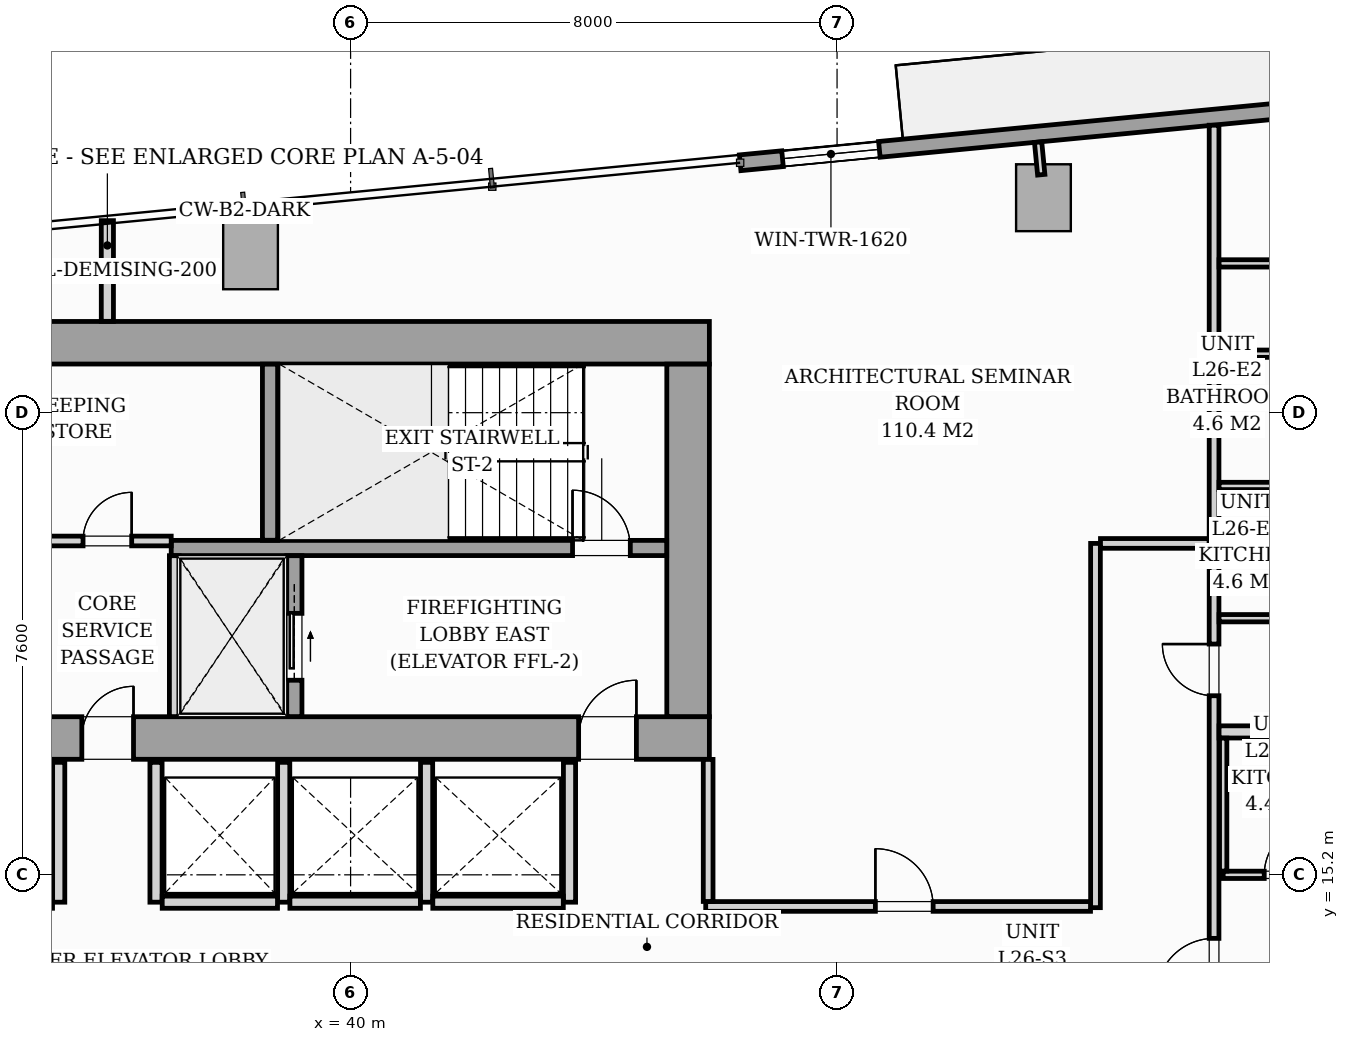
"""IFC4 building model, lengths in metres.
Left out: names, types, materials, properties, quantities, classifications, styles, units other than length and angle.
Written with IfcOpenShell. Run it as: python <this file> out.ifc"""

import sys

from ifc_helpers import new_model, si_unit, direction, frame, frame_2d, origin, origin_2d, place, context, subcontext, project, spatial, rectangle, i_section, extrude, source, transform, mapped, element, fill, save


model = new_model("IFC4")
c1 = context("Model", 3, precision=1e-05, world=origin(), true_north=direction((0.0, 1.0)))
c2 = subcontext(c1, "Body", "Model", "MODEL_VIEW")
j1 = project(units=[si_unit("LENGTHUNIT", "METRE"), si_unit("PLANEANGLEUNIT", "RADIAN")], contexts=[c1])
p1 = place(None, origin())
s1 = spatial("IfcSite", under=j1, at=p1, CompositionType="ELEMENT")
p2 = place(p1, origin())
s2 = spatial("IfcBuilding", under=s1, at=p2, CompositionType="ELEMENT")
p3 = place(p2, frame((0.0, 0.0, 93.8)))
s3 = spatial("IfcBuildingStorey", under=s2, at=p3, CompositionType="ELEMENT", Elevation=93.8)
m1 = source(origin(), c2, "Body", "SweptSolid", [
    extrude(i_section(OverallWidth=0.427, OverallDepth=0.483, WebThickness=0.051, FlangeThickness=0.082, FilletRadius=0.018, at=origin_2d()), origin(), (0.0, 0.0, 1.0), 3.196),
])
for number, where, z_axis, x_axis in (
    (1, (38.88, 17.4, 0.002), (0.0, 0.0, 1.0), (1.0, 0.0, 0.0)),
    (2, (45.6, 17.4, 0.002), (0.0, 0.0, 1.0), (1.0, 0.0, 0.0)),
    (3, (38.88, 24.0, 0.002), (0.0, 0.0, 1.0), (1.0, 0.0, 0.0)),
    (4, (45.6, 24.0, 0.002), (0.0, 0.0, 1.0), (1.0, 0.0, 0.0)),
):
    element("IfcColumn", number, at=place(p3, frame(where, z_axis=z_axis, x_axis=x_axis)), inside=s3, PredefinedType="PILASTER", context=c2, shape_type="MappedRepresentation", body=[
        mapped(m1, transform((0.0, 0.0, 0.0), scale=1.0)),
    ])
m2 = source(origin(), c2, "Body", "SweptSolid", [
    extrude(rectangle(XDim=0.9, YDim=1.1, at=origin_2d()), origin(), (0.0, 0.0, 1.0), 3.196),
])
for number, where, z_axis, x_axis in (
    (5, (38.354, 25.38, 0.002), (0.0, 0.0, 1.0), (0.995, 0.096, 0.0)),
    (6, (51.394, 26.335, 0.002), (0.0, 0.0, 1.0), (0.995, 0.096, 0.0)),
):
    element("IfcColumn", number, at=place(p3, frame(where, z_axis=z_axis, x_axis=x_axis)), inside=s3, PredefinedType="COLUMN", context=c2, shape_type="MappedRepresentation", body=[
        mapped(m2, transform((0.0, 0.0, 0.0), scale=1.0)),
    ])
p4 = place(p3, frame((46.406, 26.91, 0.0), z_axis=(0.0, 0.0, 1.0), x_axis=(0.995396638587, 0.095841180552, 0.0)))
e7 = element("IfcWall", 7, at=p4, inside=s3, PredefinedType="STANDARD", context=c2, shape_type="SweptSolid", body=[
    extrude(rectangle(XDim=19.11, YDim=0.26, at=frame_2d((9.555, 0.0))), origin(), (0.0, 0.0, 1.0), 2.94),
])
p5 = place(p4, frame((9.48, 0.0, 0.0)))
e8 = element("IfcOpeningElement", 8, at=p5, cuts=e7, PredefinedType="OPENING", context=c2, shape_type="SweptSolid", body=[
    extrude(rectangle(XDim=1.8, YDim=2.06, at=frame_2d((0.9, 1.03))), frame((0.0, 0.14, 0.0), z_axis=(0.0, -1.0, 0.0), x_axis=(1.0, 0.0, 0.0)), (0.0, 0.0, 1.0), 0.28),
])
p6 = place(p4, frame((0.7, 0.0, 0.65)))
e9 = element("IfcOpeningElement", 9, at=p6, cuts=e7, PredefinedType="OPENING", context=c2, shape_type="SweptSolid", body=[
    extrude(rectangle(XDim=1.6, YDim=1.5, at=frame_2d((0.8, 0.75))), frame((0.0, 0.14, 0.0), z_axis=(0.0, -1.0, 0.0), x_axis=(1.0, 0.0, 0.0)), (0.0, 0.0, 1.0), 0.28),
])
p7 = place(p3, frame((26.1, 17.45, 0.0), z_axis=(0.0, 0.0, 1.0), x_axis=(1.0, 0.0, 0.0)))
e10 = element("IfcWall", 10, at=p7, inside=s3, PredefinedType="SHEAR", context=c2, shape_type="SweptSolid", body=[
    extrude(rectangle(XDim=19.8, YDim=0.7, at=frame_2d((9.9, 0.0))), origin(), (0.0, 0.0, 1.0), 3.2),
])
p8 = place(p7, frame((1.05, 0.0, 0.0)))
e11 = element("IfcOpeningElement", 11, at=p8, cuts=e10, PredefinedType="OPENING", context=c2, shape_type="SweptSolid", body=[
    extrude(rectangle(XDim=0.95, YDim=2.06, at=frame_2d((0.475, 1.03))), frame((0.0, 0.36, 0.0), z_axis=(0.0, -1.0, 0.0), x_axis=(1.0, 0.0, 0.0)), (0.0, 0.0, 1.0), 0.72),
])
p9 = place(p7, frame((9.48, 0.0, 0.0)))
e12 = element("IfcOpeningElement", 12, at=p9, cuts=e10, PredefinedType="OPENING", context=c2, shape_type="SweptSolid", body=[
    extrude(rectangle(XDim=0.85, YDim=2.0, at=frame_2d((0.425, 1.0))), frame((0.0, 0.36, 0.0), z_axis=(0.0, -1.0, 0.0), x_axis=(1.0, 0.0, 0.0)), (0.0, 0.0, 1.0), 0.72),
])
p10 = place(p7, frame((17.65, 0.0, 0.0)))
e13 = element("IfcOpeningElement", 13, at=p10, cuts=e10, PredefinedType="OPENING", context=c2, shape_type="SweptSolid", body=[
    extrude(rectangle(XDim=0.95, YDim=2.06, at=frame_2d((0.475, 1.03))), frame((0.0, 0.36, 0.0), z_axis=(0.0, -1.0, 0.0), x_axis=(1.0, 0.0, 0.0)), (0.0, 0.0, 1.0), 0.72),
])
p11 = place(p3, frame((26.1, 23.95, 0.0), z_axis=(0.0, 0.0, 1.0), x_axis=(1.0, 0.0, 0.0)))
e14 = element("IfcWall", 14, at=p11, inside=s3, PredefinedType="SHEAR", context=c2, shape_type="SweptSolid", body=[
    extrude(rectangle(XDim=19.8, YDim=0.7, at=frame_2d((9.9, 0.0))), origin(), (0.0, 0.0, 1.0), 3.2),
])
p12 = place(p3, frame((45.55, 17.802, 0.0), z_axis=(0.0, 0.0, 1.0), x_axis=(0.0, 1.0, 0.0)))
e15 = element("IfcWall", 15, at=p12, inside=s3, PredefinedType="SHEAR", context=c2, shape_type="SweptSolid", body=[
    extrude(rectangle(XDim=5.796, YDim=0.7, at=frame_2d((2.898, 0.0))), origin(), (0.0, 0.0, 1.0), 3.2),
])
p13 = place(p3, frame((37.05, 20.575, 0.0), z_axis=(0.0, 0.0, 1.0), x_axis=(1.0, 0.0, 0.0)))
e16 = element("IfcWall", 16, at=p13, inside=s3, PredefinedType="SOLIDWALL", context=c2, shape_type="SweptSolid", body=[
    extrude(rectangle(XDim=8.148, YDim=0.25, at=frame_2d((4.074, 0.0))), origin(), (0.0, 0.0, 1.0), 3.2),
])
p14 = place(p13, frame((6.6, 0.0, 0.0)))
e17 = element("IfcOpeningElement", 17, at=p14, cuts=e16, PredefinedType="OPENING", context=c2, shape_type="SweptSolid", body=[
    extrude(rectangle(XDim=0.95, YDim=2.06, at=frame_2d((0.475, 1.03))), frame((0.0, 0.135, 0.0), z_axis=(0.0, -1.0, 0.0), x_axis=(1.0, 0.0, 0.0)), (0.0, 0.0, 1.0), 0.27),
])
p15 = place(p3, frame((38.675, 20.702, 0.0), z_axis=(0.0, 0.0, 1.0), x_axis=(0.0, 1.0, 0.0)))
e18 = element("IfcWall", 18, at=p15, inside=s3, PredefinedType="SOLIDWALL", context=c2, shape_type="SweptSolid", body=[
    extrude(rectangle(XDim=2.896, YDim=0.25, at=frame_2d((1.448, 0.0))), origin(), (0.0, 0.0, 1.0), 3.2),
])
p16 = place(p3, frame((37.1, 17.802, 0.0), z_axis=(0.0, 0.0, 1.0), x_axis=(0.0, 1.0, 0.0)))
e19 = element("IfcWall", 19, at=p16, inside=s3, PredefinedType="PARTITIONING", context=c2, shape_type="SweptSolid", body=[
    extrude(rectangle(XDim=2.646, YDim=0.16, at=frame_2d((1.323, 0.0))), origin(), (0.0, 0.0, 1.0), 2.94),
])
p17 = place(p3, frame((39.075, 17.802, 0.0), z_axis=(0.0, 0.0, 1.0), x_axis=(0.0, 1.0, 0.0)))
e20 = element("IfcWall", 20, at=p17, inside=s3, PredefinedType="SOLIDWALL", context=c2, shape_type="SweptSolid", body=[
    extrude(rectangle(XDim=2.646, YDim=0.25, at=frame_2d((1.323, 0.0))), origin(), (0.0, 0.0, 1.0), 3.2),
])
p18 = place(p17, frame((0.598, 0.0, 0.0)))
e21 = element("IfcOpeningElement", 21, at=p18, cuts=e20, PredefinedType="OPENING", context=c2, shape_type="SweptSolid", body=[
    extrude(rectangle(XDim=1.1, YDim=2.08, at=frame_2d((0.55, 1.04))), frame((0.0, 0.135, 0.0), z_axis=(0.0, -1.0, 0.0), x_axis=(1.0, 0.0, 0.0)), (0.0, 0.0, 1.0), 0.27),
])
p19 = place(p3, frame((34.95, 20.69, 0.0), z_axis=(0.0, 0.0, 1.0), x_axis=(1.0, 0.0, 0.0)))
e22 = element("IfcWall", 22, at=p19, inside=s3, PredefinedType="PARTITIONING", context=c2, shape_type="SweptSolid", body=[
    extrude(rectangle(XDim=2.1, YDim=0.16, at=frame_2d((1.05, 0.0))), origin(), (0.0, 0.0, 1.0), 2.94),
])
p20 = place(p19, frame((0.65, 0.0, 0.0)))
e23 = element("IfcOpeningElement", 23, at=p20, cuts=e22, PredefinedType="OPENING", context=c2, shape_type="SweptSolid", body=[
    extrude(rectangle(XDim=0.8, YDim=2.05, at=frame_2d((0.4, 1.025))), frame((0.0, 0.09, 0.0), z_axis=(0.0, -1.0, 0.0), x_axis=(1.0, 0.0, 0.0)), (0.0, 0.0, 1.0), 0.18),
])
for number, where, z_axis, x_axis in (
    (24, (35.2, 14.75, 0.0), (0.0, 0.0, 1.0), (0.0, 1.0, 0.0)),
    (25, (36.8, 14.75, 0.0), (0.0, 0.0, 1.0), (0.0, 1.0, 0.0)),
    (26, (38.9, 14.75, 0.0), (0.0, 0.0, 1.0), (0.0, 1.0, 0.0)),
):
    element("IfcWall", number, at=place(p3, frame(where, z_axis=z_axis, x_axis=x_axis)), inside=s3, PredefinedType="PARTITIONING", context=c2, shape_type="SweptSolid", body=[
        extrude(rectangle(XDim=2.3, YDim=0.2, at=frame_2d((1.15, 0.0))), origin(), (0.0, 0.0, 1.0), 2.94),
    ])
p21 = place(p3, frame((36.902, 14.75, 0.0), z_axis=(0.0, 0.0, 1.0), x_axis=(1.0, 0.0, 0.0)))
e27 = element("IfcWall", 27, at=p21, inside=s3, PredefinedType="PARTITIONING", context=c2, shape_type="SweptSolid", body=[
    extrude(rectangle(XDim=1.896, YDim=0.2, at=frame_2d((0.948, 0.0))), origin(), (0.0, 0.0, 1.0), 2.94),
])
for number, where, z_axis, x_axis in (
    (28, (41.25, 14.75, 0.0), (0.0, 0.0, 1.0), (0.0, 1.0, 0.0)),
    (29, (43.6, 14.75, 0.0), (0.0, 0.0, 1.0), (0.0, 1.0, 0.0)),
):
    element("IfcWall", number, at=place(p3, frame(where, z_axis=z_axis, x_axis=x_axis)), inside=s3, PredefinedType="PARTITIONING", context=c2, shape_type="SweptSolid", body=[
        extrude(rectangle(XDim=2.3, YDim=0.2, at=frame_2d((1.15, 0.0))), origin(), (0.0, 0.0, 1.0), 2.94),
    ])
for number, where, z_axis, x_axis in (
    (30, (39.002, 14.75, 0.0), (0.0, 0.0, 1.0), (1.0, 0.0, 0.0)),
    (31, (41.352, 14.75, 0.0), (0.0, 0.0, 1.0), (1.0, 0.0, 0.0)),
):
    element("IfcWall", number, at=place(p3, frame(where, z_axis=z_axis, x_axis=x_axis)), inside=s3, PredefinedType="PARTITIONING", context=c2, shape_type="SweptSolid", body=[
        extrude(rectangle(XDim=2.146, YDim=0.2, at=frame_2d((1.073, 0.0))), origin(), (0.0, 0.0, 1.0), 2.94),
    ])
p22 = place(p3, frame((54.2, 12.712, 0.0), z_axis=(0.0, 0.0, 1.0), x_axis=(0.0, 1.0, 0.0)))
e32 = element("IfcWall", 32, at=p22, inside=s3, PredefinedType="PARTITIONING", context=c2, shape_type="SweptSolid", body=[
    extrude(rectangle(XDim=14.815, YDim=0.16, at=frame_2d((7.408, 0.0))), origin(), (0.0, 0.0, 1.0), 2.94),
])
p23 = place(p22, frame((0.493, 0.0, 0.0)))
e33 = element("IfcOpeningElement", 33, at=p23, cuts=e32, PredefinedType="OPENING", context=c2, shape_type="SweptSolid", body=[
    extrude(rectangle(XDim=0.95, YDim=2.06, at=frame_2d((0.475, 1.03))), frame((0.0, 0.09, 0.0), z_axis=(0.0, -1.0, 0.0), x_axis=(1.0, 0.0, 0.0)), (0.0, 0.0, 1.0), 0.18),
])
p24 = place(p22, frame((5.433, 0.0, 0.0)))
e34 = element("IfcOpeningElement", 34, at=p24, cuts=e32, PredefinedType="OPENING", context=c2, shape_type="SweptSolid", body=[
    extrude(rectangle(XDim=0.85, YDim=2.0, at=frame_2d((0.425, 1.0))), frame((0.0, 0.09, 0.0), z_axis=(0.0, -1.0, 0.0), x_axis=(1.0, 0.0, 0.0)), (0.0, 0.0, 1.0), 0.18),
])
p25 = place(p3, frame((36.0, 24.302, 0.0), z_axis=(0.0, 0.0, 1.0), x_axis=(0.0, 1.0, 0.0)))
e35 = element("IfcWall", 35, at=p25, inside=s3, PredefinedType="PARTITIONING", context=c2, shape_type="SweptSolid", body=[
    extrude(rectangle(XDim=1.656, YDim=0.2, at=frame_2d((0.828, 0.0))), origin(), (0.0, 0.0, 1.0), 2.94),
])
p26 = place(p3, frame((54.282, 17.55, 0.0), z_axis=(0.0, 0.0, 1.0), x_axis=(1.0, 0.0, 0.0)))
e36 = element("IfcWall", 36, at=p26, inside=s3, PredefinedType="PARTITIONING", context=c2, shape_type="SweptSolid", body=[
    extrude(rectangle(XDim=14.655, YDim=0.2, at=frame_2d((7.328, 0.0))), origin(), (0.0, 0.0, 1.0), 2.94),
])
p27 = place(p3, frame((54.35, 15.2, 0.0), z_axis=(0.0, 0.0, 1.0), x_axis=(1.0, 0.0, 0.0)))
e37 = element("IfcWall", 37, at=p27, inside=s3, PredefinedType="PARTITIONING", context=c2, shape_type="SweptSolid", body=[
    extrude(rectangle(XDim=4.2, YDim=0.12, at=frame_2d((2.1, 0.0))), origin(), (0.0, 0.0, 1.0), 2.94),
])
p28 = place(p27, frame((0.675, 0.0, 0.0)))
e38 = element("IfcOpeningElement", 38, at=p28, cuts=e37, PredefinedType="OPENING", context=c2, shape_type="SweptSolid", body=[
    extrude(rectangle(XDim=0.85, YDim=2.05, at=frame_2d((0.425, 1.025))), frame((0.0, 0.07, 0.0), z_axis=(0.0, -1.0, 0.0), x_axis=(1.0, 0.0, 0.0)), (0.0, 0.0, 1.0), 0.14),
])
p29 = place(p27, frame((2.8, 0.0, 0.0)))
e39 = element("IfcOpeningElement", 39, at=p29, cuts=e37, PredefinedType="OPENING", context=c2, shape_type="SweptSolid", body=[
    extrude(rectangle(XDim=0.8, YDim=2.02, at=frame_2d((0.4, 1.01))), frame((0.0, 0.07, 0.0), z_axis=(0.0, -1.0, 0.0), x_axis=(1.0, 0.0, 0.0)), (0.0, 0.0, 1.0), 0.14),
])
p30 = place(p3, frame((54.35, 15.262, 0.0), z_axis=(0.0, 0.0, 1.0), x_axis=(0.0, 1.0, 0.0)))
e40 = element("IfcWall", 40, at=p30, inside=s3, PredefinedType="PARTITIONING", context=c2, shape_type="SweptSolid", body=[
    extrude(rectangle(XDim=2.186, YDim=0.12, at=frame_2d((1.093, 0.0))), origin(), (0.0, 0.0, 1.0), 2.94),
])
for number, where, z_axis, x_axis in (
    (41, (54.282, 21.595, 0.0), (0.0, 0.0, 1.0), (1.0, 0.0, 0.0)),
    (42, (54.282, 19.42, 0.0), (0.0, 0.0, 1.0), (1.0, 0.0, 0.0)),
    (43, (54.282, 23.77, 0.0), (0.0, 0.0, 1.0), (1.0, 0.0, 0.0)),
):
    element("IfcWall", number, at=place(p3, frame(where, z_axis=z_axis, x_axis=x_axis)), inside=s3, PredefinedType="PARTITIONING", context=c2, shape_type="SweptSolid", body=[
        extrude(rectangle(XDim=2.256, YDim=0.12, at=frame_2d((1.128, 0.0))), origin(), (0.0, 0.0, 1.0), 2.94),
    ])
p31 = place(p3, frame((54.282, 25.255, 0.0), z_axis=(0.0, 0.0, 1.0), x_axis=(1.0, 0.0, 0.0)))
e44 = element("IfcWall", 44, at=p31, inside=s3, PredefinedType="PARTITIONING", context=c2, shape_type="SweptSolid", body=[
    extrude(rectangle(XDim=6.901, YDim=0.12, at=frame_2d((3.451, 0.0))), origin(), (0.0, 0.0, 1.0), 2.94),
])
p32 = place(p31, frame((3.056, 0.0, 0.0)))
e45 = element("IfcOpeningElement", 45, at=p32, cuts=e44, PredefinedType="OPENING", context=c2, shape_type="SweptSolid", body=[
    extrude(rectangle(XDim=0.85, YDim=2.05, at=frame_2d((0.425, 1.025))), frame((0.0, 0.07, 0.0), z_axis=(0.0, -1.0, 0.0), x_axis=(1.0, 0.0, 0.0)), (0.0, 0.0, 1.0), 0.14),
])
p33 = place(p3, frame((52.25, 14.66, 0.0), z_axis=(0.0, 0.0, 1.0), x_axis=(0.0, 1.0, 0.0)))
e46 = element("IfcWall", 46, at=p33, inside=s3, PredefinedType="PARTITIONING", context=c2, shape_type="SweptSolid", body=[
    extrude(rectangle(XDim=5.99, YDim=0.16, at=frame_2d((2.995, 0.0))), origin(), (0.0, 0.0, 1.0), 2.94),
])
p34 = place(p3, frame((52.332, 20.65, 0.0), z_axis=(0.0, 0.0, 1.0), x_axis=(1.0, 0.0, 0.0)))
e47 = element("IfcWall", 47, at=p34, inside=s3, PredefinedType="PARTITIONING", context=c2, shape_type="SweptSolid", body=[
    extrude(rectangle(XDim=1.786, YDim=0.16, at=frame_2d((0.893, 0.0))), origin(), (0.0, 0.0, 1.0), 2.94),
])
p35 = place(p3, frame((45.84, 14.68, 0.0), z_axis=(0.0, 0.0, 1.0), x_axis=(1.0, 0.0, 0.0)))
e48 = element("IfcWall", 48, at=p35, inside=s3, PredefinedType="PARTITIONING", context=c2, shape_type="SweptSolid", body=[
    extrude(rectangle(XDim=6.328, YDim=0.16, at=frame_2d((3.164, 0.0))), origin(), (0.0, 0.0, 1.0), 2.94),
])
p36 = place(p35, frame((2.79, 0.0, 0.0)))
e49 = element("IfcOpeningElement", 49, at=p36, cuts=e48, PredefinedType="OPENING", context=c2, shape_type="SweptSolid", body=[
    extrude(rectangle(XDim=0.95, YDim=2.06, at=frame_2d((0.475, 1.03))), frame((0.0, 0.09, 0.0), z_axis=(0.0, -1.0, 0.0), x_axis=(1.0, 0.0, 0.0)), (0.0, 0.0, 1.0), 0.18),
])
p37 = place(p3, frame((45.88, 14.762, 0.0), z_axis=(0.0, 0.0, 1.0), x_axis=(0.0, 1.0, 0.0)))
e50 = element("IfcWall", 50, at=p37, inside=s3, PredefinedType="PARTITIONING", context=c2, shape_type="SweptSolid", body=[
    extrude(rectangle(XDim=2.336, YDim=0.16, at=frame_2d((1.168, 0.0))), origin(), (0.0, 0.0, 1.0), 2.94),
])
p38 = place(p3, frame((51.358, 26.713, 0.0), z_axis=(0.0, 0.0, 1.0), x_axis=(-0.095772948675, 0.995403205893, 0.0)))
e51 = element("IfcWall", 51, at=p38, inside=s3, PredefinedType="PARTITIONING", context=c2, shape_type="SweptSolid", body=[
    extrude(rectangle(XDim=0.538, YDim=0.12, at=frame_2d((0.269, 0.0))), origin(), (0.0, 0.0, 1.0), 2.94),
])
m3 = source(origin(), c2, "Body", "SweptSolid", [
    extrude(rectangle(XDim=1.6, YDim=1.5, at=frame_2d((0.8, 0.75))), frame((0.0, 0.03, 0.0), z_axis=(0.0, -1.0, 0.0), x_axis=(1.0, 0.0, 0.0)), (0.0, 0.0, 1.0), 0.06),
])
p39 = place(p6, origin())
e52 = element("IfcWindow", 52, at=p39, inside=s3, PartitioningType="SINGLE_PANEL", PredefinedType="WINDOW", context=c2, shape_type="MappedRepresentation", body=[
    mapped(m3, transform((0.0, 0.0, 0.0), scale=1.0)),
])
fill(e9, e52)
m4 = source(origin(), c2, "Body", "SweptSolid", [
    extrude(rectangle(XDim=0.85, YDim=2.0, at=frame_2d((0.425, 1.0))), frame((0.0, 0.025, 0.0), z_axis=(0.0, -1.0, 0.0), x_axis=(1.0, 0.0, 0.0)), (0.0, 0.0, 1.0), 0.05),
])
p40 = place(p9, origin())
e53 = element("IfcDoor", 53, at=p40, inside=s3, OperationType="SINGLE_SWING_RIGHT", PredefinedType="DOOR", context=c2, shape_type="MappedRepresentation", body=[
    mapped(m4, transform((0.0, 0.0, 0.0), scale=1.0)),
])
fill(e12, e53)
m5 = source(origin(), c2, "Body", "SweptSolid", [
    extrude(rectangle(XDim=0.95, YDim=2.06, at=frame_2d((0.475, 1.03))), frame((0.0, 0.025, 0.0), z_axis=(0.0, -1.0, 0.0), x_axis=(1.0, 0.0, 0.0)), (0.0, 0.0, 1.0), 0.05),
])
p41 = place(p10, origin())
e54 = element("IfcDoor", 54, at=p41, inside=s3, OperationType="SINGLE_SWING_RIGHT", PredefinedType="DOOR", context=c2, shape_type="MappedRepresentation", body=[
    mapped(m5, transform((0.0, 0.0, 0.0), scale=1.0)),
])
fill(e13, e54)
p42 = place(p14, origin())
e55 = element("IfcDoor", 55, at=p42, inside=s3, OperationType="SINGLE_SWING_LEFT", PredefinedType="DOOR", context=c2, shape_type="MappedRepresentation", body=[
    mapped(m5, transform((0.0, 0.0, 0.0), scale=1.0)),
])
fill(e17, e55)
m6 = source(origin(), c2, "Body", "SweptSolid", [
    extrude(rectangle(XDim=1.1, YDim=2.08, at=frame_2d((0.55, 1.04))), frame((0.0, 0.025, 0.0), z_axis=(0.0, -1.0, 0.0), x_axis=(1.0, 0.0, 0.0)), (0.0, 0.0, 1.0), 0.05),
])
p43 = place(p18, origin())
e56 = element("IfcDoor", 56, at=p43, inside=s3, OperationType="SLIDING_TO_RIGHT", PredefinedType="DOOR", context=c2, shape_type="MappedRepresentation", body=[
    mapped(m6, transform((0.0, 0.0, 0.0), scale=1.0)),
])
fill(e21, e56)
m7 = source(origin(), c2, "Body", "SweptSolid", [
    extrude(rectangle(XDim=0.8, YDim=2.05, at=frame_2d((0.4, 1.025))), frame((0.0, 0.025, 0.0), z_axis=(0.0, -1.0, 0.0), x_axis=(1.0, 0.0, 0.0)), (0.0, 0.0, 1.0), 0.05),
])
p44 = place(p20, origin())
e57 = element("IfcDoor", 57, at=p44, inside=s3, OperationType="SINGLE_SWING_RIGHT", PredefinedType="DOOR", context=c2, shape_type="MappedRepresentation", body=[
    mapped(m7, transform((0.0, 0.0, 0.0), scale=1.0)),
])
fill(e23, e57)
m8 = source(origin(), c2, "Body", "SweptSolid", [
    extrude(rectangle(XDim=0.95, YDim=2.06, at=frame_2d((0.475, 1.03))), frame((0.0, 0.025, 0.0), z_axis=(0.0, -1.0, 0.0), x_axis=(1.0, 0.0, 0.0)), (0.0, 0.0, 1.0), 0.05),
])
p45 = place(p23, origin())
e58 = element("IfcDoor", 58, at=p45, inside=s3, OperationType="SINGLE_SWING_LEFT", PredefinedType="DOOR", context=c2, shape_type="MappedRepresentation", body=[
    mapped(m8, transform((0.0, 0.0, 0.0), scale=1.0)),
])
fill(e33, e58)
m9 = source(origin(), c2, "Body", "SweptSolid", [
    extrude(rectangle(XDim=0.85, YDim=2.05, at=frame_2d((0.425, 1.025))), frame((0.0, 0.025, 0.0), z_axis=(0.0, -1.0, 0.0), x_axis=(1.0, 0.0, 0.0)), (0.0, 0.0, 1.0), 0.05),
])
p46 = place(p28, origin())
e59 = element("IfcDoor", 59, at=p46, inside=s3, OperationType="SINGLE_SWING_RIGHT", PredefinedType="DOOR", context=c2, shape_type="MappedRepresentation", body=[
    mapped(m9, transform((0.0, 0.0, 0.0), scale=1.0)),
])
fill(e38, e59)
p47 = place(p24, origin())
e60 = element("IfcDoor", 60, at=p47, inside=s3, OperationType="SINGLE_SWING_RIGHT", PredefinedType="DOOR", context=c2, shape_type="MappedRepresentation", body=[
    mapped(m4, transform((0.0, 0.0, 0.0), scale=1.0)),
])
fill(e34, e60)
p48 = place(p36, origin())
e61 = element("IfcDoor", 61, at=p48, inside=s3, OperationType="SINGLE_SWING_LEFT", PredefinedType="DOOR", context=c2, shape_type="MappedRepresentation", body=[
    mapped(m8, transform((0.0, 0.0, 0.0), scale=1.0)),
])
fill(e49, e61)
save(model, sys.argv[1])
